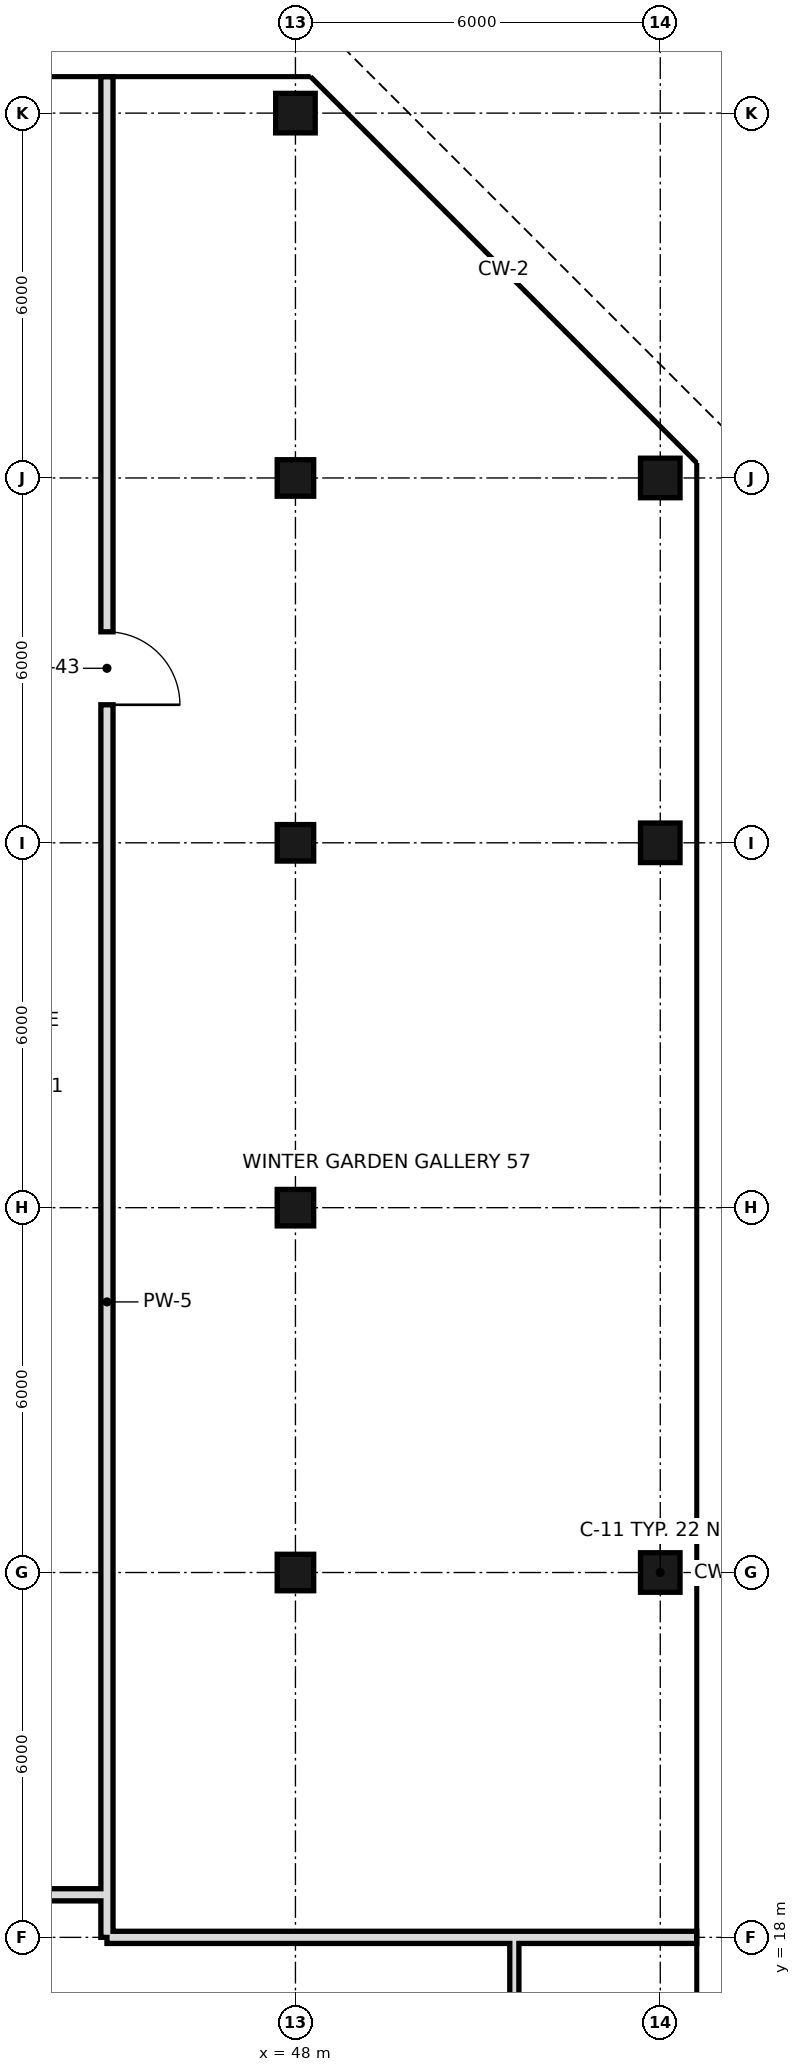
"""IFC4 building model, lengths in metres.
Left out: names, types, materials, properties, quantities, classifications, styles, units other than length and angle.
Written with IfcOpenShell. Run it as: python <this file> out.ifc"""

import sys

from ifc_helpers import new_model, si_unit, direction, frame, frame_2d, origin, origin_2d, place, context, subcontext, project, spatial, rectangle, hollow_rectangle, extrude, element, fill, save


model = new_model("IFC4")
c1 = context("Model", 3, precision=1e-05, world=origin(), true_north=direction((0.0, 1.0)))
c2 = subcontext(c1, "Body", "Model", "MODEL_VIEW")
j1 = project(units=[si_unit("LENGTHUNIT", "METRE"), si_unit("PLANEANGLEUNIT", "RADIAN")], contexts=[c1])
p1 = place(None, origin())
s1 = spatial("IfcSite", under=j1, at=p1, CompositionType="ELEMENT")
p2 = place(p1, origin())
s2 = spatial("IfcBuilding", under=s1, at=p2, CompositionType="ELEMENT")
p3 = place(p2, frame((0.0, 0.0, 243.2)))
s3 = spatial("IfcBuildingStorey", under=s2, at=p3, CompositionType="ELEMENT", Elevation=243.2)
for number, where, z_axis, x_axis in (
    (1, (48.0, 24.0, 0.0), (0.0, 0.0, 1.0), (1.0, 0.0, 0.0)),
    (2, (48.0, 30.0, 0.0), (0.0, 0.0, 1.0), (1.0, 0.0, 0.0)),
    (3, (48.0, 36.0, 0.0), (0.0, 0.0, 1.0), (1.0, 0.0, 0.0)),
    (4, (48.0, 42.0, 0.0), (0.0, 0.0, 1.0), (1.0, 0.0, 0.0)),
):
    element("IfcColumn", number, at=place(p3, frame(where, z_axis=z_axis, x_axis=x_axis)), inside=s3, PredefinedType="COLUMN", context=c2, shape_type="SweptSolid", body=[
        extrude(hollow_rectangle(XDim=0.6, YDim=0.6, WallThickness=0.028, at=origin_2d()), origin(), (0.0, 0.0, 1.0), 3.6),
    ])
for number, where, z_axis, x_axis in (
    (5, (48.0, 48.0, 0.0), (0.0, 0.0, 1.0), (1.0, 0.0, 0.0)),
    (6, (54.0, 24.0, 0.0), (0.0, 0.0, 1.0), (1.0, 0.0, 0.0)),
    (7, (54.0, 36.0, 0.0), (0.0, 0.0, 1.0), (1.0, 0.0, 0.0)),
    (8, (54.0, 42.0, 0.0), (0.0, 0.0, 1.0), (1.0, 0.0, 0.0)),
):
    element("IfcColumn", number, at=place(p3, frame(where, z_axis=z_axis, x_axis=x_axis)), inside=s3, PredefinedType="COLUMN", context=c2, shape_type="SweptSolid", body=[
        extrude(hollow_rectangle(XDim=0.65, YDim=0.65, WallThickness=0.032, at=origin_2d()), origin(), (0.0, 0.0, 1.0), 3.6),
    ])
p4 = place(p3, frame((44.9, 18.0, 0.0), z_axis=(0.0, 0.0, 1.0), x_axis=(0.0, 1.0, 0.0)))
e9 = element("IfcWall", 9, at=p4, inside=s3, PredefinedType="SOLIDWALL", context=c2, shape_type="SweptSolid", body=[
    extrude(rectangle(XDim=30.6, YDim=0.2, at=frame_2d((15.3, 0.0))), origin(), (0.0, 0.0, 1.0), 2.72),
])
p5 = place(p4, frame((20.27, 0.0, 0.0)))
e10 = element("IfcOpeningElement", 10, at=p5, cuts=e9, PredefinedType="OPENING", context=c2, shape_type="SweptSolid", body=[
    extrude(rectangle(XDim=1.2, YDim=2.4, at=frame_2d((0.6, 1.2))), frame((0.0, 0.11, 0.0), z_axis=(0.0, -1.0, 0.0), x_axis=(1.0, 0.0, 0.0)), (0.0, 0.0, 1.0), 0.22),
])
p6 = place(p3, frame((51.6, 10.8, 0.0), z_axis=(0.0, 0.0, 1.0), x_axis=(0.0, 1.0, 0.0)))
e11 = element("IfcWall", 11, at=p6, inside=s3, PredefinedType="PARTITIONING", context=c2, shape_type="SweptSolid", body=[
    extrude(rectangle(XDim=7.2, YDim=0.15, at=frame_2d((3.6, 0.0))), origin(), (0.0, 0.0, 1.0), 3.42),
])
p7 = place(p3, frame((44.9, 18.0, 0.0), z_axis=(0.0, 0.0, 1.0), x_axis=(1.0, 0.0, 0.0)))
e12 = element("IfcWall", 12, at=p7, inside=s3, PredefinedType="SOLIDWALL", context=c2, shape_type="SweptSolid", body=[
    extrude(rectangle(XDim=9.7, YDim=0.2, at=frame_2d((4.85, 0.0))), origin(), (0.0, 0.0, 1.0), 2.72),
])
p8 = place(p3, frame((40.8, 18.7, 0.0), z_axis=(0.0, 0.0, 1.0), x_axis=(1.0, 0.0, 0.0)))
e13 = element("IfcWall", 13, at=p8, inside=s3, PredefinedType="SOLIDWALL", context=c2, shape_type="SweptSolid", body=[
    extrude(rectangle(XDim=4.1, YDim=0.2, at=frame_2d((2.05, 0.0))), origin(), (0.0, 0.0, 1.0), 2.72),
])
p9 = place(p5, frame((1.2, 0.0, 0.0), z_axis=(0.0, 0.0, 1.0), x_axis=(-1.0, 0.0, 0.0)))
e14 = element("IfcDoor", 14, at=p9, inside=s3, OperationType="SINGLE_SWING_RIGHT", PredefinedType="DOOR", context=c2, shape_type="SweptSolid", body=[
    extrude(rectangle(XDim=1.2, YDim=2.4, at=frame_2d((0.6, 1.2))), frame((0.0, 0.025, 0.0), z_axis=(0.0, -1.0, 0.0), x_axis=(1.0, 0.0, 0.0)), (0.0, 0.0, 1.0), 0.05),
])
fill(e10, e14)
save(model, sys.argv[1])
